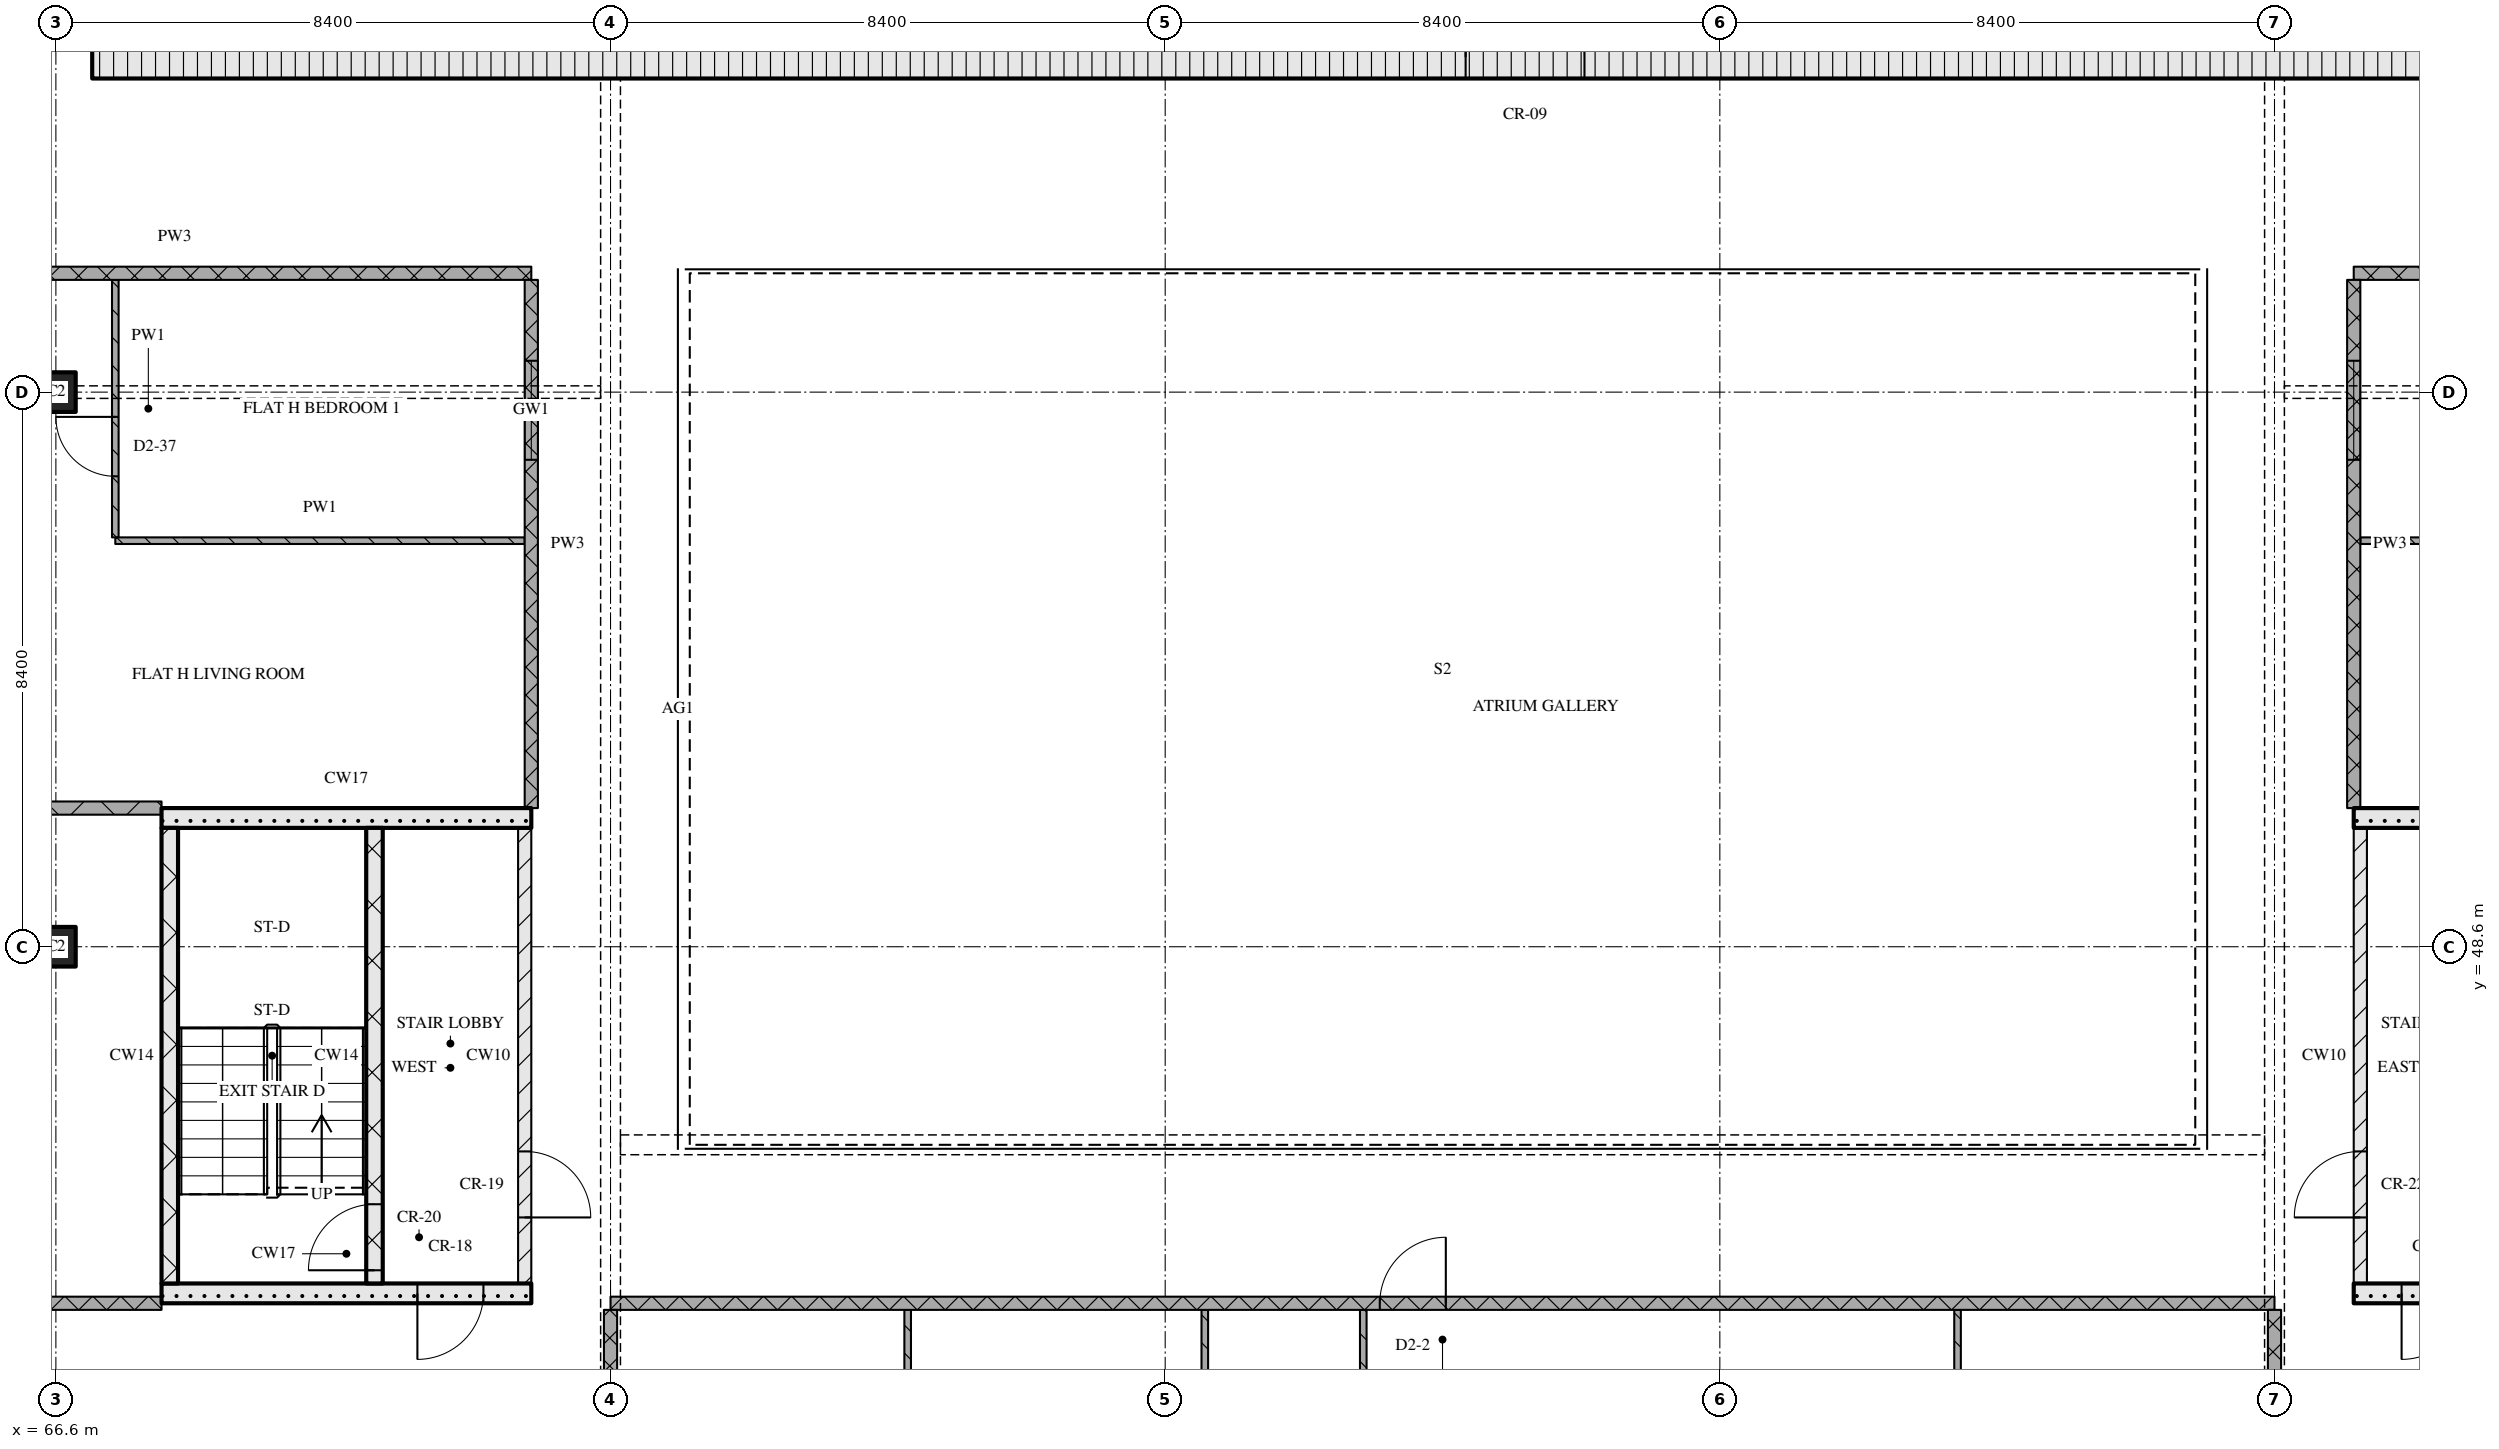
"""IFC4 building model, lengths in metres.
Left out: names, types, materials, properties, quantities, classifications, styles, units other than length and angle.
Written with IfcOpenShell. Run it as: python <this file> out.ifc"""

import sys

from ifc_helpers import new_model, si_unit, direction, frame, frame_2d, origin, origin_2d, place, context, subcontext, project, spatial, rectangle, extrude, element, fill, save


model = new_model("IFC4")
c1 = context("Model", 3, precision=1e-05, world=origin(), true_north=direction((0.0, 1.0)))
c2 = subcontext(c1, "Body", "Model", "MODEL_VIEW")
j1 = project(units=[si_unit("LENGTHUNIT", "METRE"), si_unit("PLANEANGLEUNIT", "RADIAN")], contexts=[c1])
p1 = place(None, origin())
s1 = spatial("IfcSite", under=j1, at=p1, CompositionType="ELEMENT")
p2 = place(p1, origin())
s2 = spatial("IfcBuilding", under=s1, at=p2, CompositionType="ELEMENT")
p3 = place(p2, frame((0.0, 0.0, 216.3)))
s3 = spatial("IfcBuildingStorey", under=s2, at=p3, CompositionType="ELEMENT", Elevation=216.3)
for number, where, z_axis, x_axis in (
    (1, (66.6, 48.6, 0.0), (0.0, 0.0, 1.0), (1.0, 0.0, 0.0)),
    (2, (66.6, 57.0, 0.0), (0.0, 0.0, 1.0), (1.0, 0.0, 0.0)),
):
    element("IfcColumn", number, at=place(p3, frame(where, z_axis=z_axis, x_axis=x_axis)), inside=s3, PredefinedType="COLUMN", context=c2, shape_type="SweptSolid", body=[
        extrude(rectangle(XDim=0.6, YDim=0.6, at=origin_2d()), origin(), (0.0, 0.0, 1.0), 3.6),
    ])
p4 = place(p3, frame((67.15, 62.075, 0.0), z_axis=(0.0, 0.0, 1.0), x_axis=(1.0, 0.0, 0.0)))
e3 = element("IfcWall", 3, at=p4, inside=s3, PredefinedType="SOLIDWALL", context=c2, shape_type="SweptSolid", body=[
    extrude(rectangle(XDim=40.9, YDim=0.65, at=frame_2d((20.45, 0.0))), origin(), (0.0, 0.0, 1.0), 3.32),
])
p5 = place(p4, frame((20.8, 0.0, 0.0)))
e4 = element("IfcOpeningElement", 4, at=p5, cuts=e3, PredefinedType="OPENING", context=c2, shape_type="SweptSolid", body=[
    extrude(rectangle(XDim=1.8, YDim=2.1, at=frame_2d((0.9, 1.05))), frame((0.0, 0.335, 0.0), z_axis=(0.0, -1.0, 0.0), x_axis=(1.0, 0.0, 0.0)), (0.0, 0.0, 1.0), 0.67),
])
p6 = place(p3, frame((68.2, 43.35, 0.0), z_axis=(0.0, 0.0, 1.0), x_axis=(1.0, 0.0, 0.0)))
e5 = element("IfcWall", 5, at=p6, inside=s3, PredefinedType="SOLIDWALL", context=c2, shape_type="SweptSolid", body=[
    extrude(rectangle(XDim=5.6, YDim=0.3, at=frame_2d((2.8, 0.0))), origin(), (0.0, 0.0, 1.0), 3.32),
])
p7 = place(p6, frame((3.875, 0.0, 0.0)))
e6 = element("IfcOpeningElement", 6, at=p7, cuts=e5, PredefinedType="OPENING", context=c2, shape_type="SweptSolid", body=[
    extrude(rectangle(XDim=1.0, YDim=2.1, at=frame_2d((0.5, 1.05))), frame((0.0, 0.16, 0.0), z_axis=(0.0, -1.0, 0.0), x_axis=(1.0, 0.0, 0.0)), (0.0, 0.0, 1.0), 0.32),
])
p8 = place(p3, frame((68.325, 43.5, 0.0), z_axis=(0.0, 0.0, 1.0), x_axis=(0.0, 1.0, 0.0)))
e7 = element("IfcWall", 7, at=p8, inside=s3, PredefinedType="SOLIDWALL", context=c2, shape_type="SweptSolid", body=[
    extrude(rectangle(XDim=6.9, YDim=0.25, at=frame_2d((3.45, 0.0))), origin(), (0.0, 0.0, 1.0), 3.32),
])
p9 = place(p3, frame((71.425, 43.5, 0.0), z_axis=(0.0, 0.0, 1.0), x_axis=(0.0, 1.0, 0.0)))
e8 = element("IfcWall", 8, at=p9, inside=s3, PredefinedType="SOLIDWALL", context=c2, shape_type="SweptSolid", body=[
    extrude(rectangle(XDim=6.9, YDim=0.25, at=frame_2d((3.45, 0.0))), origin(), (0.0, 0.0, 1.0), 3.32),
])
p10 = place(p9, frame((0.2, 0.0, 0.0)))
e9 = element("IfcOpeningElement", 9, at=p10, cuts=e8, PredefinedType="OPENING", context=c2, shape_type="SweptSolid", body=[
    extrude(rectangle(XDim=1.0, YDim=2.1, at=frame_2d((0.5, 1.05))), frame((0.0, 0.135, 0.0), z_axis=(0.0, -1.0, 0.0), x_axis=(1.0, 0.0, 0.0)), (0.0, 0.0, 1.0), 0.27),
])
p11 = place(p3, frame((73.7, 43.5, 0.0), z_axis=(0.0, 0.0, 1.0), x_axis=(0.0, 1.0, 0.0)))
e10 = element("IfcWall", 10, at=p11, inside=s3, PredefinedType="PARTITIONING", context=c2, shape_type="SweptSolid", body=[
    extrude(rectangle(XDim=6.9, YDim=0.2, at=frame_2d((3.45, 0.0))), origin(), (0.0, 0.0, 1.0), 3.32),
])
p12 = place(p11, frame((1.0, 0.0, 0.0)))
e11 = element("IfcOpeningElement", 11, at=p12, cuts=e10, PredefinedType="OPENING", context=c2, shape_type="SweptSolid", body=[
    extrude(rectangle(XDim=1.0, YDim=2.1, at=frame_2d((0.5, 1.05))), frame((0.0, 0.11, 0.0), z_axis=(0.0, -1.0, 0.0), x_axis=(1.0, 0.0, 0.0)), (0.0, 0.0, 1.0), 0.22),
])
p13 = place(p3, frame((68.2, 50.55, 0.0), z_axis=(0.0, 0.0, 1.0), x_axis=(1.0, 0.0, 0.0)))
e12 = element("IfcWall", 12, at=p13, inside=s3, PredefinedType="SOLIDWALL", context=c2, shape_type="SweptSolid", body=[
    extrude(rectangle(XDim=5.6, YDim=0.3, at=frame_2d((2.8, 0.0))), origin(), (0.0, 0.0, 1.0), 3.32),
])
p14 = place(p3, frame((101.4, 43.35, 0.0), z_axis=(0.0, 0.0, 1.0), x_axis=(1.0, 0.0, 0.0)))
e13 = element("IfcWall", 13, at=p14, inside=s3, PredefinedType="SOLIDWALL", context=c2, shape_type="SweptSolid", body=[
    extrude(rectangle(XDim=5.6, YDim=0.3, at=frame_2d((2.8, 0.0))), origin(), (0.0, 0.0, 1.0), 3.32),
])
p15 = place(p14, frame((0.725, 0.0, 0.0)))
e14 = element("IfcOpeningElement", 14, at=p15, cuts=e13, PredefinedType="OPENING", context=c2, shape_type="SweptSolid", body=[
    extrude(rectangle(XDim=1.0, YDim=2.1, at=frame_2d((0.5, 1.05))), frame((0.0, 0.16, 0.0), z_axis=(0.0, -1.0, 0.0), x_axis=(1.0, 0.0, 0.0)), (0.0, 0.0, 1.0), 0.32),
])
p16 = place(p3, frame((101.5, 43.5, 0.0), z_axis=(0.0, 0.0, 1.0), x_axis=(0.0, 1.0, 0.0)))
e15 = element("IfcWall", 15, at=p16, inside=s3, PredefinedType="PARTITIONING", context=c2, shape_type="SweptSolid", body=[
    extrude(rectangle(XDim=6.9, YDim=0.2, at=frame_2d((3.45, 0.0))), origin(), (0.0, 0.0, 1.0), 3.32),
])
p17 = place(p16, frame((1.0, 0.0, 0.0)))
e16 = element("IfcOpeningElement", 16, at=p17, cuts=e15, PredefinedType="OPENING", context=c2, shape_type="SweptSolid", body=[
    extrude(rectangle(XDim=1.0, YDim=2.1, at=frame_2d((0.5, 1.05))), frame((0.0, 0.11, 0.0), z_axis=(0.0, -1.0, 0.0), x_axis=(1.0, 0.0, 0.0)), (0.0, 0.0, 1.0), 0.22),
])
p18 = place(p3, frame((101.4, 50.55, 0.0), z_axis=(0.0, 0.0, 1.0), x_axis=(1.0, 0.0, 0.0)))
e17 = element("IfcWall", 17, at=p18, inside=s3, PredefinedType="SOLIDWALL", context=c2, shape_type="SweptSolid", body=[
    extrude(rectangle(XDim=5.6, YDim=0.3, at=frame_2d((2.8, 0.0))), origin(), (0.0, 0.0, 1.0), 3.32),
])
p19 = place(p3, frame((63.0, 43.2, 0.0), z_axis=(0.0, 0.0, 1.0), x_axis=(1.0, 0.0, 0.0)))
e18 = element("IfcWall", 18, at=p19, inside=s3, PredefinedType="PARTITIONING", context=c2, shape_type="SweptSolid", body=[
    extrude(rectangle(XDim=5.2, YDim=0.2, at=frame_2d((2.6, 0.0))), origin(), (0.0, 0.0, 1.0), 3.32),
])
p20 = place(p3, frame((100.2, 43.2, 0.0), z_axis=(0.0, 0.0, 1.0), x_axis=(-1.0, 0.0, 0.0)))
e19 = element("IfcWall", 19, at=p20, inside=s3, PredefinedType="PARTITIONING", context=c2, shape_type="SweptSolid", body=[
    extrude(rectangle(XDim=25.2, YDim=0.2, at=frame_2d((12.6, 0.0))), origin(), (0.0, 0.0, 1.0), 3.32),
])
p21 = place(p20, frame((12.55, 0.0, 0.0)))
e20 = element("IfcOpeningElement", 20, at=p21, cuts=e19, PredefinedType="OPENING", context=c2, shape_type="SweptSolid", body=[
    extrude(rectangle(XDim=1.0, YDim=2.1, at=frame_2d((0.5, 1.05))), frame((0.0, 0.11, 0.0), z_axis=(0.0, -1.0, 0.0), x_axis=(1.0, 0.0, 0.0)), (0.0, 0.0, 1.0), 0.22),
])
p22 = place(p3, frame((63.1, 50.7, 0.0), z_axis=(0.0, 0.0, 1.0), x_axis=(1.0, 0.0, 0.0)))
e21 = element("IfcWall", 21, at=p22, inside=s3, PredefinedType="PARTITIONING", context=c2, shape_type="SweptSolid", body=[
    extrude(rectangle(XDim=5.1, YDim=0.2, at=frame_2d((2.55, 0.0))), origin(), (0.0, 0.0, 1.0), 3.32),
])
p23 = place(p3, frame((67.5, 54.75, 0.0), z_axis=(0.0, 0.0, 1.0), x_axis=(1.0, 0.0, 0.0)))
e22 = element("IfcWall", 22, at=p23, inside=s3, PredefinedType="PARTITIONING", context=c2, shape_type="SweptSolid", body=[
    extrude(rectangle(XDim=6.2, YDim=0.1, at=frame_2d((3.1, 0.0))), origin(), (0.0, 0.0, 1.0), 3.32),
])
p24 = place(p3, frame((101.5, 54.75, 0.0), z_axis=(0.0, 0.0, 1.0), x_axis=(1.0, 0.0, 0.0)))
e23 = element("IfcWall", 23, at=p24, inside=s3, PredefinedType="PARTITIONING", context=c2, shape_type="SweptSolid", body=[
    extrude(rectangle(XDim=6.8, YDim=0.1, at=frame_2d((3.4, 0.0))), origin(), (0.0, 0.0, 1.0), 3.32),
])
p25 = place(p24, frame((2.9, 0.0, 0.0)))
e24 = element("IfcOpeningElement", 24, at=p25, cuts=e23, PredefinedType="OPENING", context=c2, shape_type="SweptSolid", body=[
    extrude(rectangle(XDim=0.9, YDim=2.1, at=frame_2d((0.45, 1.05))), frame((0.0, 0.06, 0.0), z_axis=(0.0, -1.0, 0.0), x_axis=(1.0, 0.0, 0.0)), (0.0, 0.0, 1.0), 0.12),
])
for number, where, z_axis, x_axis in (
    (25, (63.0, 58.8, 0.0), (0.0, 0.0, 1.0), (1.0, 0.0, 0.0)),
    (26, (101.4, 58.8, 0.0), (0.0, 0.0, 1.0), (1.0, 0.0, 0.0)),
):
    element("IfcWall", number, at=place(p3, frame(where, z_axis=z_axis, x_axis=x_axis)), inside=s3, PredefinedType="PARTITIONING", context=c2, shape_type="SweptSolid", body=[
        extrude(rectangle(XDim=10.8, YDim=0.2, at=frame_2d((5.4, 0.0))), origin(), (0.0, 0.0, 1.0), 3.32),
    ])
p26 = place(p3, frame((67.5, 58.7, 0.0), z_axis=(0.0, 0.0, 1.0), x_axis=(0.0, -1.0, 0.0)))
e27 = element("IfcWall", 27, at=p26, inside=s3, PredefinedType="PARTITIONING", context=c2, shape_type="SweptSolid", body=[
    extrude(rectangle(XDim=3.9, YDim=0.1, at=frame_2d((1.95, 0.0))), origin(), (0.0, 0.0, 1.0), 3.32),
])
p27 = place(p26, frame((2.075, 0.0, 0.0)))
e28 = element("IfcOpeningElement", 28, at=p27, cuts=e27, PredefinedType="OPENING", context=c2, shape_type="SweptSolid", body=[
    extrude(rectangle(XDim=0.9, YDim=2.1, at=frame_2d((0.45, 1.05))), frame((0.0, 0.06, 0.0), z_axis=(0.0, -1.0, 0.0), x_axis=(1.0, 0.0, 0.0)), (0.0, 0.0, 1.0), 0.12),
])
p28 = place(p3, frame((73.8, 58.7, 0.0), z_axis=(0.0, 0.0, 1.0), x_axis=(0.0, -1.0, 0.0)))
e29 = element("IfcWall", 29, at=p28, inside=s3, PredefinedType="PARTITIONING", context=c2, shape_type="SweptSolid", body=[
    extrude(rectangle(XDim=8.0, YDim=0.2, at=frame_2d((4.0, 0.0))), origin(), (0.0, 0.0, 1.0), 3.32),
])
p29 = place(p28, frame((1.225, 0.0, 0.9)))
e30 = element("IfcOpeningElement", 30, at=p29, cuts=e29, PredefinedType="OPENING", context=c2, shape_type="SweptSolid", body=[
    extrude(rectangle(XDim=1.5, YDim=1.5, at=frame_2d((0.75, 0.75))), frame((0.0, 0.11, 0.0), z_axis=(0.0, -1.0, 0.0), x_axis=(1.0, 0.0, 0.0)), (0.0, 0.0, 1.0), 0.22),
])
p30 = place(p3, frame((75.0, 43.1, 0.0), z_axis=(0.0, 0.0, 1.0), x_axis=(0.0, -1.0, 0.0)))
e31 = element("IfcWall", 31, at=p30, inside=s3, PredefinedType="PARTITIONING", context=c2, shape_type="SweptSolid", body=[
    extrude(rectangle(XDim=2.2, YDim=0.2, at=frame_2d((1.1, 0.0))), origin(), (0.0, 0.0, 1.0), 2.53),
])
for number, where, z_axis, x_axis in (
    (32, (79.5, 43.1, 0.0), (0.0, 0.0, 1.0), (0.0, -1.0, 0.0)),
    (33, (84.0, 43.1, 0.0), (0.0, 0.0, 1.0), (0.0, -1.0, 0.0)),
    (34, (86.4, 43.1, 0.0), (0.0, 0.0, 1.0), (0.0, -1.0, 0.0)),
    (35, (95.4, 43.1, 0.0), (0.0, 0.0, 1.0), (0.0, -1.0, 0.0)),
):
    element("IfcWall", number, at=place(p3, frame(where, z_axis=z_axis, x_axis=x_axis)), inside=s3, PredefinedType="PARTITIONING", context=c2, shape_type="SweptSolid", body=[
        extrude(rectangle(XDim=4.95, YDim=0.1, at=frame_2d((2.475, 0.0))), origin(), (0.0, 0.0, 1.0), 3.32),
    ])
p31 = place(p3, frame((100.2, 43.1, 0.0), z_axis=(0.0, 0.0, 1.0), x_axis=(0.0, -1.0, 0.0)))
e36 = element("IfcWall", 36, at=p31, inside=s3, PredefinedType="PARTITIONING", context=c2, shape_type="SweptSolid", body=[
    extrude(rectangle(XDim=2.2, YDim=0.2, at=frame_2d((1.1, 0.0))), origin(), (0.0, 0.0, 1.0), 2.53),
])
p32 = place(p3, frame((101.4, 58.7, 0.0), z_axis=(0.0, 0.0, 1.0), x_axis=(0.0, -1.0, 0.0)))
e37 = element("IfcWall", 37, at=p32, inside=s3, PredefinedType="PARTITIONING", context=c2, shape_type="SweptSolid", body=[
    extrude(rectangle(XDim=8.0, YDim=0.2, at=frame_2d((4.0, 0.0))), origin(), (0.0, 0.0, 1.0), 3.32),
])
p33 = place(p32, frame((1.225, 0.0, 0.9)))
e38 = element("IfcOpeningElement", 38, at=p33, cuts=e37, PredefinedType="OPENING", context=c2, shape_type="SweptSolid", body=[
    extrude(rectangle(XDim=1.5, YDim=1.5, at=frame_2d((0.75, 0.75))), frame((0.0, 0.11, 0.0), z_axis=(0.0, -1.0, 0.0), x_axis=(1.0, 0.0, 0.0)), (0.0, 0.0, 1.0), 0.22),
])
p34 = place(p5, origin())
e39 = element("IfcDoor", 39, at=p34, inside=s3, OperationType="DOUBLE_DOOR_SINGLE_SWING", PredefinedType="DOOR", context=c2, shape_type="SweptSolid", body=[
    extrude(rectangle(XDim=1.8, YDim=2.1, at=frame_2d((0.9, 1.05))), frame((0.0, 0.025, 0.0), z_axis=(0.0, -1.0, 0.0), x_axis=(1.0, 0.0, 0.0)), (0.0, 0.0, 1.0), 0.05),
])
fill(e4, e39)
p35 = place(p7, origin())
e40 = element("IfcDoor", 40, at=p35, inside=s3, OperationType="SINGLE_SWING_RIGHT", PredefinedType="DOOR", context=c2, shape_type="SweptSolid", body=[
    extrude(rectangle(XDim=1.0, YDim=2.1, at=frame_2d((0.5, 1.05))), frame((0.0, 0.025, 0.0), z_axis=(0.0, -1.0, 0.0), x_axis=(1.0, 0.0, 0.0)), (0.0, 0.0, 1.0), 0.05),
])
fill(e6, e40)
p36 = place(p10, origin())
e41 = element("IfcDoor", 41, at=p36, inside=s3, OperationType="SINGLE_SWING_LEFT", PredefinedType="DOOR", context=c2, shape_type="SweptSolid", body=[
    extrude(rectangle(XDim=1.0, YDim=2.1, at=frame_2d((0.5, 1.05))), frame((0.0, 0.025, 0.0), z_axis=(0.0, -1.0, 0.0), x_axis=(1.0, 0.0, 0.0)), (0.0, 0.0, 1.0), 0.05),
])
fill(e9, e41)
p37 = place(p12, origin())
e42 = element("IfcDoor", 42, at=p37, inside=s3, OperationType="SINGLE_SWING_RIGHT", PredefinedType="DOOR", context=c2, shape_type="SweptSolid", body=[
    extrude(rectangle(XDim=1.0, YDim=2.1, at=frame_2d((0.5, 1.05))), frame((0.0, 0.025, 0.0), z_axis=(0.0, -1.0, 0.0), x_axis=(1.0, 0.0, 0.0)), (0.0, 0.0, 1.0), 0.05),
])
fill(e11, e42)
p38 = place(p15, origin())
e43 = element("IfcDoor", 43, at=p38, inside=s3, OperationType="SINGLE_SWING_RIGHT", PredefinedType="DOOR", context=c2, shape_type="SweptSolid", body=[
    extrude(rectangle(XDim=1.0, YDim=2.1, at=frame_2d((0.5, 1.05))), frame((0.0, 0.025, 0.0), z_axis=(0.0, -1.0, 0.0), x_axis=(1.0, 0.0, 0.0)), (0.0, 0.0, 1.0), 0.05),
])
fill(e14, e43)
p39 = place(p17, origin())
e44 = element("IfcDoor", 44, at=p39, inside=s3, OperationType="SINGLE_SWING_LEFT", PredefinedType="DOOR", context=c2, shape_type="SweptSolid", body=[
    extrude(rectangle(XDim=1.0, YDim=2.1, at=frame_2d((0.5, 1.05))), frame((0.0, 0.025, 0.0), z_axis=(0.0, -1.0, 0.0), x_axis=(1.0, 0.0, 0.0)), (0.0, 0.0, 1.0), 0.05),
])
fill(e16, e44)
p40 = place(p21, origin())
e45 = element("IfcDoor", 45, at=p40, inside=s3, OperationType="SINGLE_SWING_RIGHT", PredefinedType="DOOR", context=c2, shape_type="SweptSolid", body=[
    extrude(rectangle(XDim=1.0, YDim=2.1, at=frame_2d((0.5, 1.05))), frame((0.0, 0.025, 0.0), z_axis=(0.0, -1.0, 0.0), x_axis=(1.0, 0.0, 0.0)), (0.0, 0.0, 1.0), 0.05),
])
fill(e20, e45)
p41 = place(p27, origin())
e46 = element("IfcDoor", 46, at=p41, inside=s3, OperationType="SINGLE_SWING_RIGHT", PredefinedType="DOOR", context=c2, shape_type="SweptSolid", body=[
    extrude(rectangle(XDim=0.9, YDim=2.1, at=frame_2d((0.45, 1.05))), frame((0.0, 0.025, 0.0), z_axis=(0.0, -1.0, 0.0), x_axis=(1.0, 0.0, 0.0)), (0.0, 0.0, 1.0), 0.05),
])
fill(e28, e46)
p42 = place(p29, origin())
e47 = element("IfcWindow", 47, at=p42, inside=s3, PartitioningType="SINGLE_PANEL", PredefinedType="WINDOW", context=c2, shape_type="SweptSolid", body=[
    extrude(rectangle(XDim=1.5, YDim=1.5, at=frame_2d((0.75, 0.75))), frame((0.0, 0.03, 0.0), z_axis=(0.0, -1.0, 0.0), x_axis=(1.0, 0.0, 0.0)), (0.0, 0.0, 1.0), 0.06),
])
fill(e30, e47)
p43 = place(p33, origin())
e48 = element("IfcWindow", 48, at=p43, inside=s3, PartitioningType="SINGLE_PANEL", PredefinedType="WINDOW", context=c2, shape_type="SweptSolid", body=[
    extrude(rectangle(XDim=1.5, YDim=1.5, at=frame_2d((0.75, 0.75))), frame((0.0, 0.03, 0.0), z_axis=(0.0, -1.0, 0.0), x_axis=(1.0, 0.0, 0.0)), (0.0, 0.0, 1.0), 0.06),
])
fill(e38, e48)
save(model, sys.argv[1])
